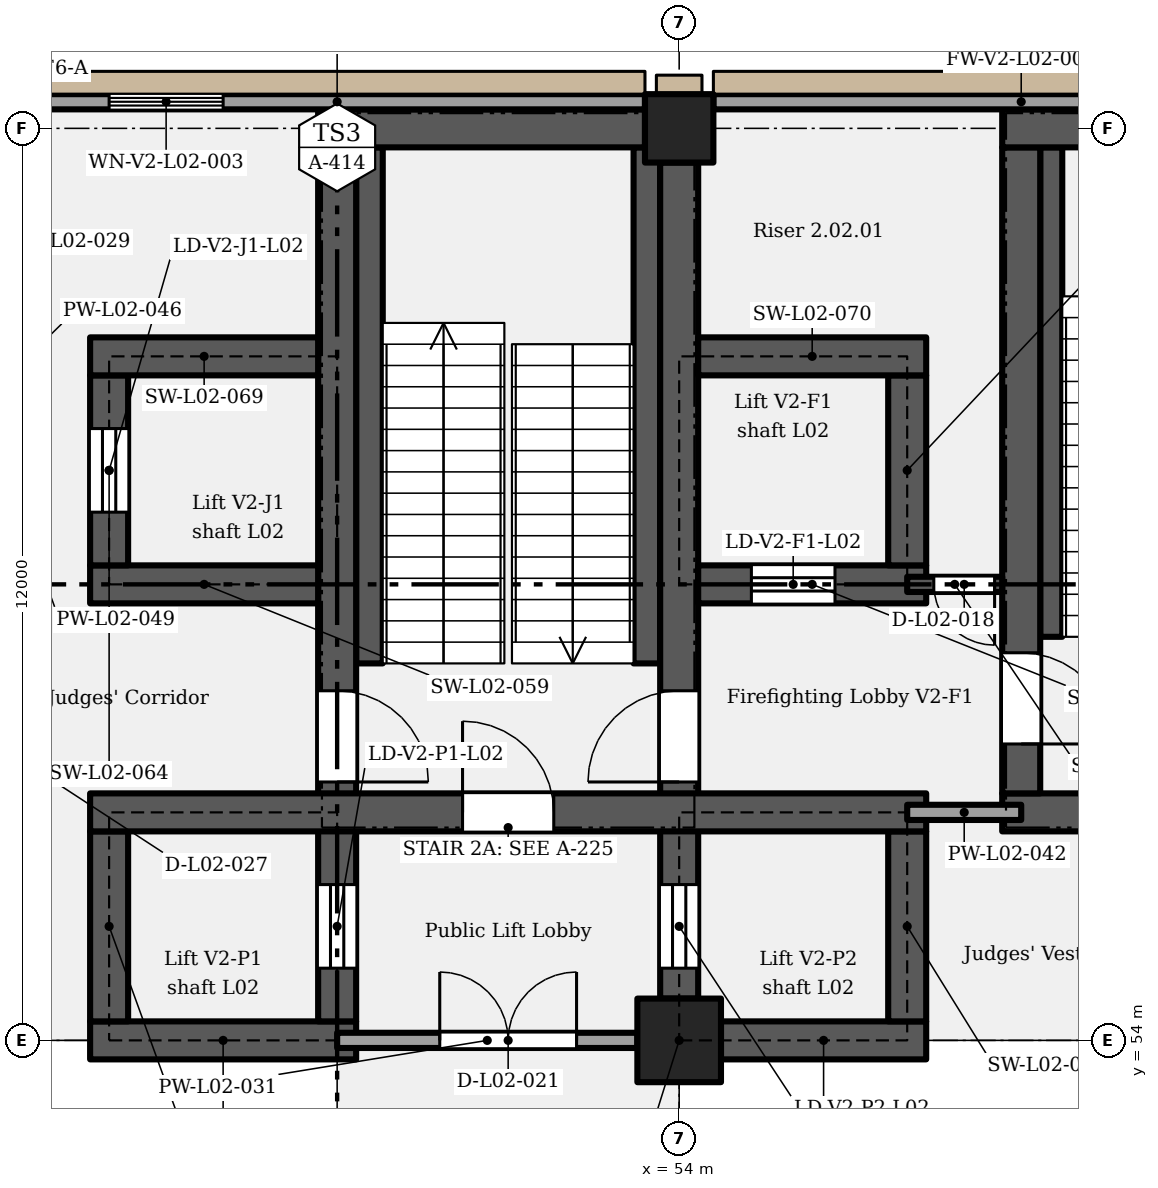
"""IFC4 building model, lengths in metres.
Left out: names, types, materials, properties, quantities, classifications, styles, units other than length and angle.
Written with IfcOpenShell. Run it as: python <this file> out.ifc"""

import sys

from ifc_helpers import new_model, si_unit, direction, frame, frame_2d, origin, origin_2d, place, context, subcontext, project, spatial, rectangle, extrude, element, fill, save


model = new_model("IFC4")
c1 = context("Model", 3, precision=1e-05, world=origin(), true_north=direction((0.0, 1.0)))
c2 = subcontext(c1, "Body", "Model", "MODEL_VIEW")
j1 = project(units=[si_unit("LENGTHUNIT", "METRE"), si_unit("PLANEANGLEUNIT", "RADIAN")], contexts=[c1])
p1 = place(None, origin())
s1 = spatial("IfcSite", under=j1, at=p1, CompositionType="ELEMENT")
p2 = place(p1, origin())
s2 = spatial("IfcBuilding", under=s1, at=p2, CompositionType="ELEMENT")
p3 = place(p2, frame((0.0, 0.0, 12.0)))
s3 = spatial("IfcBuildingStorey", under=s2, at=p3, CompositionType="ELEMENT", Elevation=12.0)
p4 = place(p3, frame((54.0, 54.0, 0.0), z_axis=(0.0, 0.0, 1.0), x_axis=(1.0, 0.0, 0.0)))
e1 = element("IfcColumn", 1, at=p4, inside=s3, PredefinedType="COLUMN", context=c2, shape_type="SweptSolid", body=[
    extrude(rectangle(XDim=1.1, YDim=1.1, at=origin_2d()), origin(), (0.0, 0.0, 1.0), 5.4),
])
p5 = place(p3, frame((54.0, 66.0, 0.0), z_axis=(0.0, 0.0, 1.0), x_axis=(1.0, 0.0, 0.0)))
e2 = element("IfcColumn", 2, at=p5, inside=s3, PredefinedType="COLUMN", context=c2, shape_type="SweptSolid", body=[
    extrude(rectangle(XDim=0.9, YDim=0.9, at=origin_2d()), origin(), (0.0, 0.0, 1.0), 5.4),
])
p6 = place(p3, frame((46.25, 54.0, 0.0), z_axis=(0.0, 0.0, 1.0), x_axis=(1.0, 0.0, 0.0)))
e3 = element("IfcWall", 3, at=p6, inside=s3, PredefinedType="SHEAR", context=c2, shape_type="SweptSolid", body=[
    extrude(rectangle(XDim=3.5, YDim=0.5, at=frame_2d((1.75, 0.0))), origin(), (0.0, 0.0, 1.0), 5.15),
])
p7 = place(p3, frame((54.55, 54.0, 0.0), z_axis=(0.0, 0.0, 1.0), x_axis=(1.0, 0.0, 0.0)))
e4 = element("IfcWall", 4, at=p7, inside=s3, PredefinedType="SHEAR", context=c2, shape_type="SweptSolid", body=[
    extrude(rectangle(XDim=2.7, YDim=0.5, at=frame_2d((1.35, 0.0))), origin(), (0.0, 0.0, 1.0), 5.15),
])
p8 = place(p3, frame((46.5, 54.25, 0.0), z_axis=(0.0, 0.0, 1.0), x_axis=(0.0, 1.0, 0.0)))
e5 = element("IfcWall", 5, at=p8, inside=s3, PredefinedType="SHEAR", context=c2, shape_type="SweptSolid", body=[
    extrude(rectangle(XDim=2.5, YDim=0.5, at=frame_2d((1.25, 0.0))), origin(), (0.0, 0.0, 1.0), 5.15),
])
p9 = place(p3, frame((49.5, 54.25, 0.0), z_axis=(0.0, 0.0, 1.0), x_axis=(0.0, 1.0, 0.0)))
e6 = element("IfcWall", 6, at=p9, inside=s3, PredefinedType="SHEAR", context=c2, shape_type="SweptSolid", body=[
    extrude(rectangle(XDim=11.5, YDim=0.5, at=frame_2d((5.75, 0.0))), origin(), (0.0, 0.0, 1.0), 5.15),
])
p10 = place(p9, frame((0.7, 0.0, 0.0)))
e7 = element("IfcOpeningElement", 7, at=p10, cuts=e6, PredefinedType="OPENING", context=c2, shape_type="SweptSolid", body=[
    extrude(rectangle(XDim=1.1, YDim=2.1, at=frame_2d((0.55, 1.05))), frame((0.0, 0.26, 0.0), z_axis=(0.0, -1.0, 0.0), x_axis=(1.0, 0.0, 0.0)), (0.0, 0.0, 1.0), 0.52),
])
p11 = place(p9, frame((4.35, 0.0, 0.0), z_axis=(0.0, 0.0, 1.0), x_axis=(-1.0, 0.0, 0.0)))
e8 = element("IfcOpeningElement", 8, at=p11, cuts=e6, PredefinedType="OPENING", context=c2, shape_type="SweptSolid", body=[
    extrude(rectangle(XDim=1.2, YDim=2.1, at=frame_2d((0.6, 1.05))), frame((0.0, 0.26, 0.0), z_axis=(0.0, -1.0, 0.0), x_axis=(1.0, 0.0, 0.0)), (0.0, 0.0, 1.0), 0.52),
])
p12 = place(p3, frame((57.0, 54.25, 0.0), z_axis=(0.0, 0.0, 1.0), x_axis=(0.0, 1.0, 0.0)))
e9 = element("IfcWall", 9, at=p12, inside=s3, PredefinedType="SHEAR", context=c2, shape_type="SweptSolid", body=[
    extrude(rectangle(XDim=2.5, YDim=0.5, at=frame_2d((1.25, 0.0))), origin(), (0.0, 0.0, 1.0), 5.15),
])
p13 = place(p3, frame((54.0, 54.55, 0.0), z_axis=(0.0, 0.0, 1.0), x_axis=(0.0, 1.0, 0.0)))
e10 = element("IfcWall", 10, at=p13, inside=s3, PredefinedType="SHEAR", context=c2, shape_type="SweptSolid", body=[
    extrude(rectangle(XDim=11.0, YDim=0.5, at=frame_2d((5.5, 0.0))), origin(), (0.0, 0.0, 1.0), 5.15),
])
p14 = place(p13, frame((0.4, 0.0, 0.0)))
e11 = element("IfcOpeningElement", 11, at=p14, cuts=e10, PredefinedType="OPENING", context=c2, shape_type="SweptSolid", body=[
    extrude(rectangle(XDim=1.1, YDim=2.1, at=frame_2d((0.55, 1.05))), frame((0.0, 0.26, 0.0), z_axis=(0.0, -1.0, 0.0), x_axis=(1.0, 0.0, 0.0)), (0.0, 0.0, 1.0), 0.52),
])
p15 = place(p13, frame((2.85, 0.0, 0.0)))
e12 = element("IfcOpeningElement", 12, at=p15, cuts=e10, PredefinedType="OPENING", context=c2, shape_type="SweptSolid", body=[
    extrude(rectangle(XDim=1.2, YDim=2.1, at=frame_2d((0.6, 1.05))), frame((0.0, 0.26, 0.0), z_axis=(0.0, -1.0, 0.0), x_axis=(1.0, 0.0, 0.0)), (0.0, 0.0, 1.0), 0.52),
])
p16 = place(p3, frame((46.25, 57.0, 0.0), z_axis=(0.0, 0.0, 1.0), x_axis=(1.0, 0.0, 0.0)))
e13 = element("IfcWall", 13, at=p16, inside=s3, PredefinedType="SHEAR", context=c2, shape_type="SweptSolid", body=[
    extrude(rectangle(XDim=11.0, YDim=0.5, at=frame_2d((5.5, 0.0))), origin(), (0.0, 0.0, 1.0), 5.15),
])
p17 = place(p16, frame((4.9, 0.0, 0.0)))
e14 = element("IfcOpeningElement", 14, at=p17, cuts=e13, PredefinedType="OPENING", context=c2, shape_type="SweptSolid", body=[
    extrude(rectangle(XDim=1.2, YDim=2.1, at=frame_2d((0.6, 1.05))), frame((0.0, 0.26, 0.0), z_axis=(0.0, -1.0, 0.0), x_axis=(1.0, 0.0, 0.0)), (0.0, 0.0, 1.0), 0.52),
])
p18 = place(p3, frame((58.25, 57.0, 0.0), z_axis=(0.0, 0.0, 1.0), x_axis=(1.0, 0.0, 0.0)))
e15 = element("IfcWall", 15, at=p18, inside=s3, PredefinedType="SHEAR", context=c2, shape_type="SweptSolid", body=[
    extrude(rectangle(XDim=5.0, YDim=0.5, at=frame_2d((2.5, 0.0))), origin(), (0.0, 0.0, 1.0), 5.15),
])
p19 = place(p18, frame((2.0, 0.0, 0.0)))
e16 = element("IfcOpeningElement", 16, at=p19, cuts=e15, PredefinedType="OPENING", context=c2, shape_type="SweptSolid", body=[
    extrude(rectangle(XDim=1.0, YDim=2.1, at=frame_2d((0.5, 1.05))), frame((0.0, 0.26, 0.0), z_axis=(0.0, -1.0, 0.0), x_axis=(1.0, 0.0, 0.0)), (0.0, 0.0, 1.0), 0.52),
])
p20 = place(p3, frame((58.5, 57.25, 0.0), z_axis=(0.0, 0.0, 1.0), x_axis=(0.0, 1.0, 0.0)))
e17 = element("IfcWall", 17, at=p20, inside=s3, PredefinedType="SHEAR", context=c2, shape_type="SweptSolid", body=[
    extrude(rectangle(XDim=8.5, YDim=0.5, at=frame_2d((4.25, 0.0))), origin(), (0.0, 0.0, 1.0), 5.15),
])
p21 = place(p20, frame((1.85, 0.0, 0.0), z_axis=(0.0, 0.0, 1.0), x_axis=(-1.0, 0.0, 0.0)))
e18 = element("IfcOpeningElement", 18, at=p21, cuts=e17, PredefinedType="OPENING", context=c2, shape_type="SweptSolid", body=[
    extrude(rectangle(XDim=1.2, YDim=2.1, at=frame_2d((0.6, 1.05))), frame((0.0, 0.26, 0.0), z_axis=(0.0, -1.0, 0.0), x_axis=(1.0, 0.0, 0.0)), (0.0, 0.0, 1.0), 0.52),
])
p22 = place(p3, frame((46.25, 60.0, 0.0), z_axis=(0.0, 0.0, 1.0), x_axis=(1.0, 0.0, 0.0)))
e19 = element("IfcWall", 19, at=p22, inside=s3, PredefinedType="SHEAR", context=c2, shape_type="SweptSolid", body=[
    extrude(rectangle(XDim=3.0, YDim=0.5, at=frame_2d((1.5, 0.0))), origin(), (0.0, 0.0, 1.0), 5.15),
])
p23 = place(p3, frame((54.25, 60.0, 0.0), z_axis=(0.0, 0.0, 1.0), x_axis=(1.0, 0.0, 0.0)))
e20 = element("IfcWall", 20, at=p23, inside=s3, PredefinedType="SHEAR", context=c2, shape_type="SweptSolid", body=[
    extrude(rectangle(XDim=3.0, YDim=0.5, at=frame_2d((1.5, 0.0))), origin(), (0.0, 0.0, 1.0), 5.15),
])
p24 = place(p23, frame((0.7, 0.0, 0.0)))
e21 = element("IfcOpeningElement", 21, at=p24, cuts=e20, PredefinedType="OPENING", context=c2, shape_type="SweptSolid", body=[
    extrude(rectangle(XDim=1.1, YDim=2.1, at=frame_2d((0.55, 1.05))), frame((0.0, 0.26, 0.0), z_axis=(0.0, -1.0, 0.0), x_axis=(1.0, 0.0, 0.0)), (0.0, 0.0, 1.0), 0.52),
])
p25 = place(p3, frame((46.5, 60.25, 0.0), z_axis=(0.0, 0.0, 1.0), x_axis=(0.0, 1.0, 0.0)))
e22 = element("IfcWall", 22, at=p25, inside=s3, PredefinedType="SHEAR", context=c2, shape_type="SweptSolid", body=[
    extrude(rectangle(XDim=2.5, YDim=0.5, at=frame_2d((1.25, 0.0))), origin(), (0.0, 0.0, 1.0), 5.15),
])
p26 = place(p25, frame((0.7, 0.0, 0.0)))
e23 = element("IfcOpeningElement", 23, at=p26, cuts=e22, PredefinedType="OPENING", context=c2, shape_type="SweptSolid", body=[
    extrude(rectangle(XDim=1.1, YDim=2.1, at=frame_2d((0.55, 1.05))), frame((0.0, 0.26, 0.0), z_axis=(0.0, -1.0, 0.0), x_axis=(1.0, 0.0, 0.0)), (0.0, 0.0, 1.0), 0.52),
])
p27 = place(p3, frame((57.0, 60.25, 0.0), z_axis=(0.0, 0.0, 1.0), x_axis=(0.0, 1.0, 0.0)))
e24 = element("IfcWall", 24, at=p27, inside=s3, PredefinedType="SHEAR", context=c2, shape_type="SweptSolid", body=[
    extrude(rectangle(XDim=2.5, YDim=0.5, at=frame_2d((1.25, 0.0))), origin(), (0.0, 0.0, 1.0), 5.15),
])
for number, where, z_axis, x_axis in (
    (25, (46.25, 63.0, 0.0), (0.0, 0.0, 1.0), (1.0, 0.0, 0.0)),
    (26, (54.25, 63.0, 0.0), (0.0, 0.0, 1.0), (1.0, 0.0, 0.0)),
):
    element("IfcWall", number, at=place(p3, frame(where, z_axis=z_axis, x_axis=x_axis)), inside=s3, PredefinedType="SHEAR", context=c2, shape_type="SweptSolid", body=[
        extrude(rectangle(XDim=3.0, YDim=0.5, at=frame_2d((1.5, 0.0))), origin(), (0.0, 0.0, 1.0), 5.15),
    ])
for number, where, z_axis, x_axis in (
    (27, (49.25, 66.0, 0.0), (0.0, 0.0, 1.0), (1.0, 0.0, 0.0)),
    (28, (58.25, 66.0, 0.0), (0.0, 0.0, 1.0), (1.0, 0.0, 0.0)),
):
    element("IfcWall", number, at=place(p3, frame(where, z_axis=z_axis, x_axis=x_axis)), inside=s3, PredefinedType="SHEAR", context=c2, shape_type="SweptSolid", body=[
        extrude(rectangle(XDim=4.3, YDim=0.5, at=frame_2d((2.15, 0.0))), origin(), (0.0, 0.0, 1.0), 5.15),
    ])
p28 = place(p3, frame((45.45, 66.35, 0.0), z_axis=(0.0, 0.0, 1.0), x_axis=(1.0, 0.0, 0.0)))
e29 = element("IfcWall", 29, at=p28, inside=s3, PredefinedType="SOLIDWALL", context=c2, shape_type="SweptSolid", body=[
    extrude(rectangle(XDim=8.1, YDim=0.2, at=frame_2d((4.05, 0.0))), origin(), (0.0, 0.0, 1.0), 5.15),
])
p29 = place(p28, frame((1.05, 0.0, 1.05)))
e30 = element("IfcOpeningElement", 30, at=p29, cuts=e29, PredefinedType="OPENING", context=c2, shape_type="SweptSolid", body=[
    extrude(rectangle(XDim=1.5, YDim=3.5, at=frame_2d((0.75, 1.75))), frame((0.0, 0.11, 0.0), z_axis=(0.0, -1.0, 0.0), x_axis=(1.0, 0.0, 0.0)), (0.0, 0.0, 1.0), 0.22),
])
p30 = place(p3, frame((54.45, 66.35, 0.0), z_axis=(0.0, 0.0, 1.0), x_axis=(1.0, 0.0, 0.0)))
e31 = element("IfcWall", 31, at=p30, inside=s3, PredefinedType="SOLIDWALL", context=c2, shape_type="SweptSolid", body=[
    extrude(rectangle(XDim=8.1, YDim=0.2, at=frame_2d((4.05, 0.0))), origin(), (0.0, 0.0, 1.0), 5.15),
])
p31 = place(p3, frame((49.5, 54.0, 0.0), z_axis=(0.0, 0.0, 1.0), x_axis=(1.0, 0.0, 0.0)))
e32 = element("IfcWall", 32, at=p31, inside=s3, PredefinedType="PARTITIONING", context=c2, shape_type="SweptSolid", body=[
    extrude(rectangle(XDim=3.95, YDim=0.2, at=frame_2d((1.975, 0.0))), origin(), (0.0, 0.0, 1.0), 4.4),
])
p32 = place(p31, frame((1.35, 0.0, 0.0)))
e33 = element("IfcOpeningElement", 33, at=p32, cuts=e32, PredefinedType="OPENING", context=c2, shape_type="SweptSolid", body=[
    extrude(rectangle(XDim=1.8, YDim=2.1, at=frame_2d((0.9, 1.05))), frame((0.0, 0.11, 0.0), z_axis=(0.0, -1.0, 0.0), x_axis=(1.0, 0.0, 0.0)), (0.0, 0.0, 1.0), 0.22),
])
p33 = place(p3, frame((57.0, 57.0, 0.0), z_axis=(0.0, 0.0, 1.0), x_axis=(1.0, 0.0, 0.0)))
e34 = element("IfcWall", 34, at=p33, inside=s3, PredefinedType="PARTITIONING", context=c2, shape_type="SweptSolid", body=[
    extrude(rectangle(XDim=1.5, YDim=0.2, at=frame_2d((0.75, 0.0))), origin(), (0.0, 0.0, 1.0), 5.15),
])
p34 = place(p3, frame((57.0, 60.0, 0.0), z_axis=(0.0, 0.0, 1.0), x_axis=(1.0, 0.0, 0.0)))
e35 = element("IfcWall", 35, at=p34, inside=s3, PredefinedType="SHEAR", context=c2, shape_type="SweptSolid", body=[
    extrude(rectangle(XDim=1.25, YDim=0.2, at=frame_2d((0.625, 0.0))), origin(), (0.0, 0.0, 1.0), 5.15),
])
p35 = place(p34, frame((1.15, 0.0, 0.0), z_axis=(0.0, 0.0, 1.0), x_axis=(-1.0, 0.0, 0.0)))
e36 = element("IfcOpeningElement", 36, at=p35, cuts=e35, PredefinedType="OPENING", context=c2, shape_type="SweptSolid", body=[
    extrude(rectangle(XDim=0.8, YDim=2.0, at=frame_2d((0.4, 1.0))), frame((0.0, 0.11, 0.0), z_axis=(0.0, -1.0, 0.0), x_axis=(1.0, 0.0, 0.0)), (0.0, 0.0, 1.0), 0.22),
])
p36 = place(p3, frame((49.925, 58.96, 0.0), z_axis=(0.0, 0.0, 1.0), x_axis=(0.0, 1.0, 0.0)))
e37 = element("IfcWall", 37, at=p36, inside=s3, PredefinedType="SHEAR", context=c2, shape_type="SweptSolid", body=[
    extrude(rectangle(XDim=6.79, YDim=0.35, at=frame_2d((3.395, 0.0))), origin(), (0.0, 0.0, 1.0), 2.587),
])
p37 = place(p3, frame((53.575, 58.96, 0.0), z_axis=(0.0, 0.0, 1.0), x_axis=(0.0, 1.0, 0.0)))
e38 = element("IfcWall", 38, at=p37, inside=s3, PredefinedType="SHEAR", context=c2, shape_type="SweptSolid", body=[
    extrude(rectangle(XDim=6.79, YDim=0.35, at=frame_2d((3.395, 0.0))), origin(), (0.0, 0.0, 1.0), 5.15),
])
p38 = place(p3, frame((58.895, 59.31, 0.0), z_axis=(0.0, 0.0, 1.0), x_axis=(0.0, 1.0, 0.0)))
e39 = element("IfcWall", 39, at=p38, inside=s3, PredefinedType="SHEAR", context=c2, shape_type="SweptSolid", body=[
    extrude(rectangle(XDim=6.44, YDim=0.29, at=frame_2d((3.22, 0.0))), origin(), (0.0, 0.0, 1.0), 2.587),
])
p39 = place(p29, origin())
e40 = element("IfcWindow", 40, at=p39, inside=s3, PartitioningType="SINGLE_PANEL", PredefinedType="WINDOW", context=c2, shape_type="SweptSolid", body=[
    extrude(rectangle(XDim=1.5, YDim=3.5, at=frame_2d((0.75, 1.75))), frame((0.0, 0.03, 0.0), z_axis=(0.0, -1.0, 0.0), x_axis=(1.0, 0.0, 0.0)), (0.0, 0.0, 1.0), 0.06),
])
fill(e30, e40)
p40 = place(p10, origin())
e41 = element("IfcDoor", 41, at=p40, inside=s3, OperationType="SLIDING_TO_LEFT", PredefinedType="DOOR", context=c2, shape_type="SweptSolid", body=[
    extrude(rectangle(XDim=1.1, YDim=2.1, at=frame_2d((0.55, 1.05))), frame((0.0, 0.025, 0.0), z_axis=(0.0, -1.0, 0.0), x_axis=(1.0, 0.0, 0.0)), (0.0, 0.0, 1.0), 0.05),
])
fill(e7, e41)
p41 = place(p14, origin())
e42 = element("IfcDoor", 42, at=p41, inside=s3, OperationType="SLIDING_TO_LEFT", PredefinedType="DOOR", context=c2, shape_type="SweptSolid", body=[
    extrude(rectangle(XDim=1.1, YDim=2.1, at=frame_2d((0.55, 1.05))), frame((0.0, 0.025, 0.0), z_axis=(0.0, -1.0, 0.0), x_axis=(1.0, 0.0, 0.0)), (0.0, 0.0, 1.0), 0.05),
])
fill(e11, e42)
p42 = place(p17, origin())
e43 = element("IfcDoor", 43, at=p42, inside=s3, OperationType="SINGLE_SWING_LEFT", PredefinedType="DOOR", context=c2, shape_type="SweptSolid", body=[
    extrude(rectangle(XDim=1.2, YDim=2.1, at=frame_2d((0.6, 1.05))), frame((0.0, 0.025, 0.0), z_axis=(0.0, -1.0, 0.0), x_axis=(1.0, 0.0, 0.0)), (0.0, 0.0, 1.0), 0.05),
])
fill(e14, e43)
p43 = place(p24, origin())
e44 = element("IfcDoor", 44, at=p43, inside=s3, OperationType="SLIDING_TO_LEFT", PredefinedType="DOOR", context=c2, shape_type="SweptSolid", body=[
    extrude(rectangle(XDim=1.1, YDim=2.1, at=frame_2d((0.55, 1.05))), frame((0.0, 0.025, 0.0), z_axis=(0.0, -1.0, 0.0), x_axis=(1.0, 0.0, 0.0)), (0.0, 0.0, 1.0), 0.05),
])
fill(e21, e44)
p44 = place(p15, origin())
e45 = element("IfcDoor", 45, at=p44, inside=s3, OperationType="SINGLE_SWING_LEFT", PredefinedType="DOOR", context=c2, shape_type="SweptSolid", body=[
    extrude(rectangle(XDim=1.2, YDim=2.1, at=frame_2d((0.6, 1.05))), frame((0.0, 0.025, 0.0), z_axis=(0.0, -1.0, 0.0), x_axis=(1.0, 0.0, 0.0)), (0.0, 0.0, 1.0), 0.05),
])
fill(e12, e45)
p45 = place(p21, origin())
e46 = element("IfcDoor", 46, at=p45, inside=s3, OperationType="SINGLE_SWING_RIGHT", PredefinedType="DOOR", context=c2, shape_type="SweptSolid", body=[
    extrude(rectangle(XDim=1.2, YDim=2.1, at=frame_2d((0.6, 1.05))), frame((0.0, 0.025, 0.0), z_axis=(0.0, -1.0, 0.0), x_axis=(1.0, 0.0, 0.0)), (0.0, 0.0, 1.0), 0.05),
])
fill(e18, e46)
p46 = place(p35, origin())
e47 = element("IfcDoor", 47, at=p46, inside=s3, OperationType="SINGLE_SWING_LEFT", PredefinedType="DOOR", context=c2, shape_type="SweptSolid", body=[
    extrude(rectangle(XDim=0.8, YDim=2.0, at=frame_2d((0.4, 1.0))), frame((0.0, 0.025, 0.0), z_axis=(0.0, -1.0, 0.0), x_axis=(1.0, 0.0, 0.0)), (0.0, 0.0, 1.0), 0.05),
])
fill(e36, e47)
p47 = place(p26, origin())
e48 = element("IfcDoor", 48, at=p47, inside=s3, OperationType="SLIDING_TO_LEFT", PredefinedType="DOOR", context=c2, shape_type="SweptSolid", body=[
    extrude(rectangle(XDim=1.1, YDim=2.1, at=frame_2d((0.55, 1.05))), frame((0.0, 0.025, 0.0), z_axis=(0.0, -1.0, 0.0), x_axis=(1.0, 0.0, 0.0)), (0.0, 0.0, 1.0), 0.05),
])
fill(e23, e48)
p48 = place(p11, origin())
e49 = element("IfcDoor", 49, at=p48, inside=s3, OperationType="SINGLE_SWING_RIGHT", PredefinedType="DOOR", context=c2, shape_type="SweptSolid", body=[
    extrude(rectangle(XDim=1.2, YDim=2.1, at=frame_2d((0.6, 1.05))), frame((0.0, 0.025, 0.0), z_axis=(0.0, -1.0, 0.0), x_axis=(1.0, 0.0, 0.0)), (0.0, 0.0, 1.0), 0.05),
])
fill(e8, e49)
p49 = place(p32, origin())
e50 = element("IfcDoor", 50, at=p49, inside=s3, OperationType="DOUBLE_DOOR_SINGLE_SWING", PredefinedType="DOOR", context=c2, shape_type="SweptSolid", body=[
    extrude(rectangle(XDim=1.8, YDim=2.1, at=frame_2d((0.9, 1.05))), frame((0.0, 0.025, 0.0), z_axis=(0.0, -1.0, 0.0), x_axis=(1.0, 0.0, 0.0)), (0.0, 0.0, 1.0), 0.05),
])
fill(e33, e50)
save(model, sys.argv[1])
